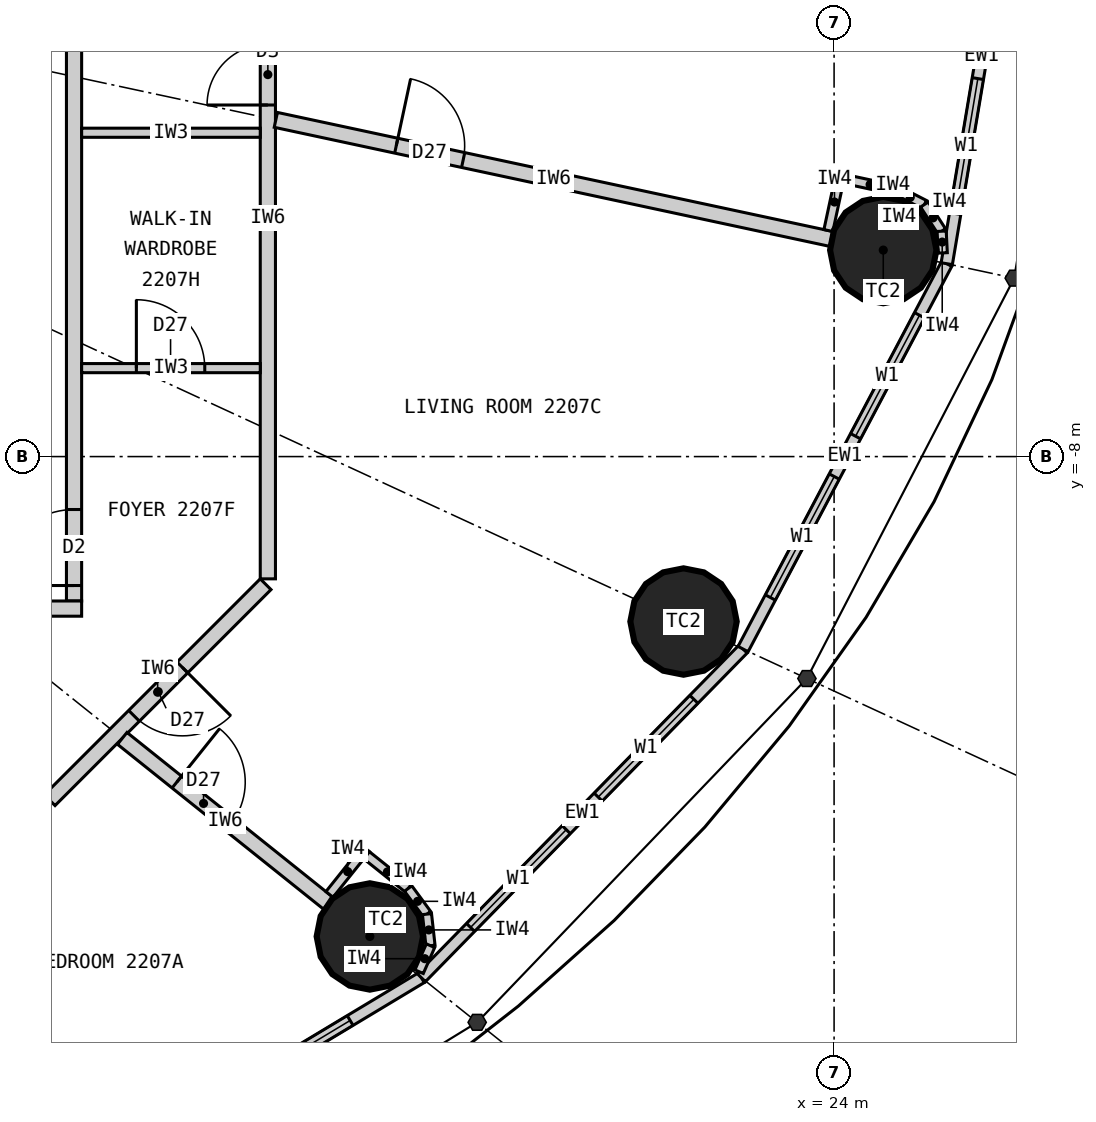
"""IFC4 building model, lengths in metres.
Left out: names, types, materials, properties, quantities, classifications, styles, units other than length and angle.
Written with IfcOpenShell. Run it as: python <this file> out.ifc"""

import sys

from ifc_helpers import new_model, si_unit, direction, frame, frame_2d, origin, origin_2d, place, context, subcontext, project, spatial, rectangle, circle, extrude, element, fill, save


model = new_model("IFC4")
c1 = context("Model", 3, precision=1e-05, world=origin(), true_north=direction((0.0, 1.0)))
c2 = subcontext(c1, "Body", "Model", "MODEL_VIEW")
j1 = project(units=[si_unit("LENGTHUNIT", "METRE"), si_unit("PLANEANGLEUNIT", "RADIAN")], contexts=[c1])
p1 = place(None, origin())
s1 = spatial("IfcSite", under=j1, at=p1, CompositionType="ELEMENT")
p2 = place(p1, origin())
s2 = spatial("IfcBuilding", under=s1, at=p2, CompositionType="ELEMENT")
p3 = place(p2, frame((0.0, 0.0, 87.0)))
s3 = spatial("IfcBuildingStorey", under=s2, at=p3, CompositionType="ELEMENT", Elevation=87.0)
for number, where, z_axis, x_axis in (
    (1, (17.892, -14.313, 0.0), (0.0, 0.0, 1.0), (1.0, 0.0, 0.0)),
    (2, (22.019, -10.17, 0.0), (0.0, 0.0, 1.0), (1.0, 0.0, 0.0)),
    (3, (24.647, -5.283, 0.0), (0.0, 0.0, 1.0), (1.0, 0.0, 0.0)),
):
    element("IfcColumn", number, at=place(p3, frame(where, z_axis=z_axis, x_axis=x_axis)), inside=s3, PredefinedType="COLUMN", context=c2, shape_type="SweptSolid", body=[
        extrude(circle(Radius=0.7, at=origin_2d()), origin(), (0.0, 0.0, 1.0), 3.3),
    ])
p4 = place(p3, frame((13.096, -18.147, 0.0), z_axis=(0.0, 0.0, 1.0), x_axis=(0.856983180864, 0.515344377787, 0.0)))
e4 = element("IfcWall", 4, at=p4, inside=s3, PredefinedType="ELEMENTEDWALL", context=c2, shape_type="SweptSolid", body=[
    extrude(rectangle(XDim=6.386, YDim=0.15, at=frame_2d((3.193, 0.0))), origin(), (0.0, 0.0, 1.0), 3.12),
])
p5 = place(p4, frame((1.093, 0.0, 0.9)))
e5 = element("IfcOpeningElement", 5, at=p5, cuts=e4, PredefinedType="OPENING", context=c2, shape_type="SweptSolid", body=[
    extrude(rectangle(XDim=1.8, YDim=1.9, at=frame_2d((0.9, 0.95))), frame((0.0, 0.085, 0.0), z_axis=(0.0, -1.0, 0.0), x_axis=(1.0, 0.0, 0.0)), (0.0, 0.0, 1.0), 0.17),
])
p6 = place(p4, frame((3.493, 0.0, 0.9)))
e6 = element("IfcOpeningElement", 6, at=p6, cuts=e4, PredefinedType="OPENING", context=c2, shape_type="SweptSolid", body=[
    extrude(rectangle(XDim=1.8, YDim=1.9, at=frame_2d((0.9, 0.95))), frame((0.0, 0.085, 0.0), z_axis=(0.0, -1.0, 0.0), x_axis=(1.0, 0.0, 0.0)), (0.0, 0.0, 1.0), 0.17),
])
p7 = place(p3, frame((18.57, -14.856, 0.0), z_axis=(0.0, 0.0, 1.0), x_axis=(0.699602905915, 0.714531856557, 0.0)))
e7 = element("IfcWall", 7, at=p7, inside=s3, PredefinedType="ELEMENTEDWALL", context=c2, shape_type="SweptSolid", body=[
    extrude(rectangle(XDim=6.051, YDim=0.15, at=frame_2d((3.025, 0.0))), origin(), (0.0, 0.0, 1.0), 3.12),
])
p8 = place(p7, frame((0.926, 0.0, 0.9)))
e8 = element("IfcOpeningElement", 8, at=p8, cuts=e7, PredefinedType="OPENING", context=c2, shape_type="SweptSolid", body=[
    extrude(rectangle(XDim=1.8, YDim=1.9, at=frame_2d((0.9, 0.95))), frame((0.0, 0.085, 0.0), z_axis=(0.0, -1.0, 0.0), x_axis=(1.0, 0.0, 0.0)), (0.0, 0.0, 1.0), 0.17),
])
p9 = place(p7, frame((3.325, 0.0, 0.9)))
e9 = element("IfcOpeningElement", 9, at=p9, cuts=e7, PredefinedType="OPENING", context=c2, shape_type="SweptSolid", body=[
    extrude(rectangle(XDim=1.8, YDim=1.9, at=frame_2d((0.9, 0.95))), frame((0.0, 0.085, 0.0), z_axis=(0.0, -1.0, 0.0), x_axis=(1.0, 0.0, 0.0)), (0.0, 0.0, 1.0), 0.17),
])
p10 = place(p3, frame((22.803, -10.532, 0.0), z_axis=(0.0, 0.0, 1.0), x_axis=(0.467296867008, 0.884100468321, 0.0)))
e10 = element("IfcWall", 10, at=p10, inside=s3, PredefinedType="ELEMENTEDWALL", context=c2, shape_type="SweptSolid", body=[
    extrude(rectangle(XDim=5.734, YDim=0.15, at=frame_2d((2.867, 0.0))), origin(), (0.0, 0.0, 1.0), 3.12),
])
p11 = place(p10, frame((0.767, 0.0, 0.9)))
e11 = element("IfcOpeningElement", 11, at=p11, cuts=e10, PredefinedType="OPENING", context=c2, shape_type="SweptSolid", body=[
    extrude(rectangle(XDim=1.8, YDim=1.9, at=frame_2d((0.9, 0.95))), frame((0.0, 0.085, 0.0), z_axis=(0.0, -1.0, 0.0), x_axis=(1.0, 0.0, 0.0)), (0.0, 0.0, 1.0), 0.17),
])
p12 = place(p10, frame((3.167, 0.0, 0.9)))
e12 = element("IfcOpeningElement", 12, at=p12, cuts=e10, PredefinedType="OPENING", context=c2, shape_type="SweptSolid", body=[
    extrude(rectangle(XDim=1.8, YDim=1.9, at=frame_2d((0.9, 0.95))), frame((0.0, 0.085, 0.0), z_axis=(0.0, -1.0, 0.0), x_axis=(1.0, 0.0, 0.0)), (0.0, 0.0, 1.0), 0.17),
])
p13 = place(p3, frame((25.482, -5.462, 0.0), z_axis=(0.0, 0.0, 1.0), x_axis=(0.165642551694, 0.986185857264, 0.0)))
e13 = element("IfcWall", 13, at=p13, inside=s3, PredefinedType="ELEMENTEDWALL", context=c2, shape_type="SweptSolid", body=[
    extrude(rectangle(XDim=5.539, YDim=0.15, at=frame_2d((2.77, 0.0))), origin(), (0.0, 0.0, 1.0), 3.12),
])
p14 = place(p13, frame((0.669, 0.0, 0.9)))
e14 = element("IfcOpeningElement", 14, at=p14, cuts=e13, PredefinedType="OPENING", context=c2, shape_type="SweptSolid", body=[
    extrude(rectangle(XDim=1.8, YDim=1.9, at=frame_2d((0.9, 0.95))), frame((0.0, 0.085, 0.0), z_axis=(0.0, -1.0, 0.0), x_axis=(1.0, 0.0, 0.0)), (0.0, 0.0, 1.0), 0.17),
])
p15 = place(p13, frame((3.07, 0.0, 0.9)))
e15 = element("IfcOpeningElement", 15, at=p15, cuts=e13, PredefinedType="OPENING", context=c2, shape_type="SweptSolid", body=[
    extrude(rectangle(XDim=1.8, YDim=1.9, at=frame_2d((0.9, 0.95))), frame((0.0, 0.085, 0.0), z_axis=(0.0, -1.0, 0.0), x_axis=(1.0, 0.0, 0.0)), (0.0, 0.0, 1.0), 0.17),
])
p16 = place(p3, frame((14.0, -9.9, 0.0), z_axis=(0.0, 0.0, 1.0), x_axis=(0.0, 1.0, 0.0)))
e16 = element("IfcWall", 16, at=p16, inside=s3, PredefinedType="PARTITIONING", context=c2, shape_type="SweptSolid", body=[
    extrude(rectangle(XDim=19.8, YDim=0.2, at=frame_2d((9.9, 0.0))), origin(), (0.0, 0.0, 1.0), 3.12),
])
p17 = place(p16, frame((0.204, 0.0, 0.0)))
e17 = element("IfcOpeningElement", 17, at=p17, cuts=e16, PredefinedType="OPENING", context=c2, shape_type="SweptSolid", body=[
    extrude(rectangle(XDim=1.0, YDim=2.2, at=frame_2d((0.5, 1.1))), frame((0.0, 0.11, 0.0), z_axis=(0.0, -1.0, 0.0), x_axis=(1.0, 0.0, 0.0)), (0.0, 0.0, 1.0), 0.22),
])
p18 = place(p16, frame((13.715, 0.0, 0.0)))
e18 = element("IfcOpeningElement", 18, at=p18, cuts=e16, PredefinedType="OPENING", context=c2, shape_type="SweptSolid", body=[
    extrude(rectangle(XDim=1.0, YDim=2.2, at=frame_2d((0.5, 1.1))), frame((0.0, 0.11, 0.0), z_axis=(0.0, -1.0, 0.0), x_axis=(1.0, 0.0, 0.0)), (0.0, 0.0, 1.0), 0.22),
])
p19 = place(p16, frame((18.698, 0.0, 0.0)))
e19 = element("IfcOpeningElement", 19, at=p19, cuts=e16, PredefinedType="OPENING", context=c2, shape_type="SweptSolid", body=[
    extrude(rectangle(XDim=1.0, YDim=2.2, at=frame_2d((0.5, 1.1))), frame((0.0, 0.11, 0.0), z_axis=(0.0, -1.0, 0.0), x_axis=(1.0, 0.0, 0.0)), (0.0, 0.0, 1.0), 0.22),
])
p20 = place(p3, frame((13.679, -12.521, 0.0), z_axis=(0.0, 0.0, 1.0), x_axis=(0.707106781187, 0.707106781187, 0.0)))
e20 = element("IfcWall", 20, at=p20, inside=s3, PredefinedType="PARTITIONING", context=c2, shape_type="SweptSolid", body=[
    extrude(rectangle(XDim=4.019, YDim=0.2, at=frame_2d((2.009, 0.0))), origin(), (0.0, 0.0, 1.0), 3.12),
])
p21 = place(p20, frame((1.57, 0.0, 0.0)))
e21 = element("IfcOpeningElement", 21, at=p21, cuts=e20, PredefinedType="OPENING", context=c2, shape_type="SweptSolid", body=[
    extrude(rectangle(XDim=0.9, YDim=2.1, at=frame_2d((0.45, 1.05))), frame((0.0, 0.11, 0.0), z_axis=(0.0, -1.0, 0.0), x_axis=(1.0, 0.0, 0.0)), (0.0, 0.0, 1.0), 0.22),
])
p22 = place(p3, frame((16.55, -9.609, 0.0), z_axis=(0.0, 0.0, 1.0), x_axis=(0.0, 1.0, 0.0)))
e22 = element("IfcWall", 22, at=p22, inside=s3, PredefinedType="PARTITIONING", context=c2, shape_type="SweptSolid", body=[
    extrude(rectangle(XDim=9.508, YDim=0.2, at=frame_2d((4.754, 0.0))), origin(), (0.0, 0.0, 1.0), 3.12),
])
p23 = place(p22, frame((6.234, 0.0, 0.0)))
e23 = element("IfcOpeningElement", 23, at=p23, cuts=e22, PredefinedType="OPENING", context=c2, shape_type="SweptSolid", body=[
    extrude(rectangle(XDim=0.8, YDim=2.1, at=frame_2d((0.4, 1.05))), frame((0.0, 0.11, 0.0), z_axis=(0.0, -1.0, 0.0), x_axis=(1.0, 0.0, 0.0)), (0.0, 0.0, 1.0), 0.22),
])
p24 = place(p3, frame((14.634, -11.707, 0.0), z_axis=(0.0, 0.0, 1.0), x_axis=(0.780903110683, -0.624652168591, 0.0)))
e24 = element("IfcWall", 24, at=p24, inside=s3, PredefinedType="PARTITIONING", context=c2, shape_type="SweptSolid", body=[
    extrude(rectangle(XDim=3.472, YDim=0.2, at=frame_2d((1.736, 0.0))), origin(), (0.0, 0.0, 1.0), 2.27),
])
p25 = place(p24, frame((0.92, 0.0, 0.0)))
e25 = element("IfcOpeningElement", 25, at=p25, cuts=e24, PredefinedType="OPENING", context=c2, shape_type="SweptSolid", body=[
    extrude(rectangle(XDim=0.9, YDim=2.1, at=frame_2d((0.45, 1.05))), frame((0.0, 0.11, 0.0), z_axis=(0.0, -1.0, 0.0), x_axis=(1.0, 0.0, 0.0)), (0.0, 0.0, 1.0), 0.22),
])
p26 = place(p3, frame((16.655, -3.57, 0.0), z_axis=(0.0, 0.0, 1.0), x_axis=(0.977790461522, -0.209584859557, 0.0)))
e26 = element("IfcWall", 26, at=p26, inside=s3, PredefinedType="PARTITIONING", context=c2, shape_type="SweptSolid", body=[
    extrude(rectangle(XDim=7.474, YDim=0.2, at=frame_2d((3.737, 0.0))), origin(), (0.0, 0.0, 1.0), 2.27),
])
p27 = place(p26, frame((1.621, 0.0, 0.0)))
e27 = element("IfcOpeningElement", 27, at=p27, cuts=e26, PredefinedType="OPENING", context=c2, shape_type="SweptSolid", body=[
    extrude(rectangle(XDim=0.9, YDim=2.1, at=frame_2d((0.45, 1.05))), frame((0.0, 0.11, 0.0), z_axis=(0.0, -1.0, 0.0), x_axis=(1.0, 0.0, 0.0)), (0.0, 0.0, 1.0), 0.22),
])
p28 = place(p3, frame((14.1, -6.836, 0.0), z_axis=(0.0, 0.0, 1.0), x_axis=(1.0, 0.0, 0.0)))
e28 = element("IfcWall", 28, at=p28, inside=s3, PredefinedType="PARTITIONING", context=c2, shape_type="SweptSolid", body=[
    extrude(rectangle(XDim=2.35, YDim=0.12, at=frame_2d((1.175, 0.0))), origin(), (0.0, 0.0, 1.0), 3.12),
])
p29 = place(p28, frame((0.72, 0.0, 0.0)))
e29 = element("IfcOpeningElement", 29, at=p29, cuts=e28, PredefinedType="OPENING", context=c2, shape_type="SweptSolid", body=[
    extrude(rectangle(XDim=0.9, YDim=2.1, at=frame_2d((0.45, 1.05))), frame((0.0, 0.07, 0.0), z_axis=(0.0, -1.0, 0.0), x_axis=(1.0, 0.0, 0.0)), (0.0, 0.0, 1.0), 0.14),
])
p30 = place(p3, frame((14.1, -3.74, 0.0), z_axis=(0.0, 0.0, 1.0), x_axis=(1.0, 0.0, 0.0)))
e30 = element("IfcWall", 30, at=p30, inside=s3, PredefinedType="PARTITIONING", context=c2, shape_type="SweptSolid", body=[
    extrude(rectangle(XDim=2.35, YDim=0.12, at=frame_2d((1.175, 0.0))), origin(), (0.0, 0.0, 1.0), 2.27),
])
p31 = place(p3, frame((14.1, -10.0, 0.0), z_axis=(0.0, 0.0, 1.0), x_axis=(-1.0, 0.0, 0.0)))
e31 = element("IfcWall", 31, at=p31, inside=s3, PredefinedType="PARTITIONING", context=c2, shape_type="SweptSolid", body=[
    extrude(rectangle(XDim=24.429, YDim=0.2, at=frame_2d((12.215, 0.0))), origin(), (0.0, 0.0, 1.0), 3.12),
])
p32 = place(p31, frame((13.597, 0.0, 0.0)))
e32 = element("IfcOpeningElement", 32, at=p32, cuts=e31, PredefinedType="OPENING", context=c2, shape_type="SweptSolid", body=[
    extrude(rectangle(XDim=1.0, YDim=2.2, at=frame_2d((0.5, 1.1))), frame((0.0, 0.11, 0.0), z_axis=(0.0, -1.0, 0.0), x_axis=(1.0, 0.0, 0.0)), (0.0, 0.0, 1.0), 0.22),
])
p33 = place(p3, frame((17.361, -13.76, 0.0), z_axis=(0.0, 0.0, 1.0), x_axis=(0.624501042889, 0.781023973659, 0.0)))
e33 = element("IfcWall", 33, at=p33, inside=s3, PredefinedType="PARTITIONING", context=c2, shape_type="SweptSolid", body=[
    extrude(rectangle(XDim=0.767, YDim=0.12, at=frame_2d((0.384, 0.0))), origin(), (0.0, 0.0, 1.0), 3.12),
])
p34 = place(p3, frame((17.85, -13.246, 0.0), z_axis=(0.0, 0.0, 1.0), x_axis=(0.780902834923, -0.62465251333, 0.0)))
e34 = element("IfcWall", 34, at=p34, inside=s3, PredefinedType="PARTITIONING", context=c2, shape_type="SweptSolid", body=[
    extrude(rectangle(XDim=0.7, YDim=0.12, at=frame_2d((0.35, 0.0))), origin(), (0.0, 0.0, 1.0), 3.12),
])
for number, where, z_axis, x_axis in (
    (35, (18.396, -13.683, 0.0), (0.0, 0.0, 1.0), (0.592, -0.806, 0.0)),
    (36, (18.644, -14.02, 0.0), (0.0, 0.0, 1.0), (0.11, -0.994, 0.0)),
):
    element("IfcWall", number, at=place(p3, frame(where, z_axis=z_axis, x_axis=x_axis)), inside=s3, PredefinedType="PARTITIONING", context=c2, shape_type="SweptSolid", body=[
        extrude(rectangle(XDim=0.418, YDim=0.12, at=frame_2d((0.209, 0.0))), origin(), (0.0, 0.0, 1.0), 3.12),
    ])
p35 = place(p3, frame((18.69, -14.435, 0.0), z_axis=(0.0, 0.0, 1.0), x_axis=(-0.401093412634, -0.91603715773, 0.0)))
e37 = element("IfcWall", 37, at=p35, inside=s3, PredefinedType="PARTITIONING", context=c2, shape_type="SweptSolid", body=[
    extrude(rectangle(XDim=0.373, YDim=0.12, at=frame_2d((0.187, 0.0))), origin(), (0.0, 0.0, 1.0), 3.12),
])
p36 = place(p3, frame((23.925, -5.026, 0.0), z_axis=(0.0, 0.0, 1.0), x_axis=(0.209681192172, 0.977769808109, 0.0)))
e38 = element("IfcWall", 38, at=p36, inside=s3, PredefinedType="PARTITIONING", context=c2, shape_type="SweptSolid", body=[
    extrude(rectangle(XDim=0.767, YDim=0.12, at=frame_2d((0.384, 0.0))), origin(), (0.0, 0.0, 1.0), 3.12),
])
p37 = place(p3, frame((24.132, -4.347, 0.0), z_axis=(0.0, 0.0, 1.0), x_axis=(0.977776882509, -0.209648200638, 0.0)))
e39 = element("IfcWall", 39, at=p37, inside=s3, PredefinedType="PARTITIONING", context=c2, shape_type="SweptSolid", body=[
    extrude(rectangle(XDim=0.7, YDim=0.12, at=frame_2d((0.35, 0.0))), origin(), (0.0, 0.0, 1.0), 3.12),
])
for number, where, z_axis, x_axis in (
    (40, (24.816, -4.494, 0.0), (0.0, 0.0, 1.0), (0.89, -0.455, 0.0)),
    (41, (25.188, -4.684, 0.0), (0.0, 0.0, 1.0), (0.543, -0.84, 0.0)),
):
    element("IfcWall", number, at=place(p3, frame(where, z_axis=z_axis, x_axis=x_axis)), inside=s3, PredefinedType="PARTITIONING", context=c2, shape_type="SweptSolid", body=[
        extrude(rectangle(XDim=0.418, YDim=0.12, at=frame_2d((0.209, 0.0))), origin(), (0.0, 0.0, 1.0), 3.12),
    ])
p38 = place(p3, frame((25.416, -5.035, 0.0), z_axis=(0.0, 0.0, 1.0), x_axis=(0.050406329159, -0.998728793007, 0.0)))
e42 = element("IfcWall", 42, at=p38, inside=s3, PredefinedType="PARTITIONING", context=c2, shape_type="SweptSolid", body=[
    extrude(rectangle(XDim=0.286, YDim=0.12, at=frame_2d((0.143, 0.0))), origin(), (0.0, 0.0, 1.0), 3.12),
])
p39 = place(p6, origin())
e43 = element("IfcWindow", 43, at=p39, inside=s3, PartitioningType="SINGLE_PANEL", PredefinedType="WINDOW", context=c2, shape_type="SweptSolid", body=[
    extrude(rectangle(XDim=1.8, YDim=1.9, at=frame_2d((0.9, 0.95))), frame((0.0, 0.03, 0.0), z_axis=(0.0, -1.0, 0.0), x_axis=(1.0, 0.0, 0.0)), (0.0, 0.0, 1.0), 0.06),
])
fill(e6, e43)
p40 = place(p8, origin())
e44 = element("IfcWindow", 44, at=p40, inside=s3, PartitioningType="SINGLE_PANEL", PredefinedType="WINDOW", context=c2, shape_type="SweptSolid", body=[
    extrude(rectangle(XDim=1.8, YDim=1.9, at=frame_2d((0.9, 0.95))), frame((0.0, 0.03, 0.0), z_axis=(0.0, -1.0, 0.0), x_axis=(1.0, 0.0, 0.0)), (0.0, 0.0, 1.0), 0.06),
])
fill(e8, e44)
p41 = place(p9, origin())
e45 = element("IfcWindow", 45, at=p41, inside=s3, PartitioningType="SINGLE_PANEL", PredefinedType="WINDOW", context=c2, shape_type="SweptSolid", body=[
    extrude(rectangle(XDim=1.8, YDim=1.9, at=frame_2d((0.9, 0.95))), frame((0.0, 0.03, 0.0), z_axis=(0.0, -1.0, 0.0), x_axis=(1.0, 0.0, 0.0)), (0.0, 0.0, 1.0), 0.06),
])
fill(e9, e45)
p42 = place(p11, origin())
e46 = element("IfcWindow", 46, at=p42, inside=s3, PartitioningType="SINGLE_PANEL", PredefinedType="WINDOW", context=c2, shape_type="SweptSolid", body=[
    extrude(rectangle(XDim=1.8, YDim=1.9, at=frame_2d((0.9, 0.95))), frame((0.0, 0.03, 0.0), z_axis=(0.0, -1.0, 0.0), x_axis=(1.0, 0.0, 0.0)), (0.0, 0.0, 1.0), 0.06),
])
fill(e11, e46)
p43 = place(p12, origin())
e47 = element("IfcWindow", 47, at=p43, inside=s3, PartitioningType="SINGLE_PANEL", PredefinedType="WINDOW", context=c2, shape_type="SweptSolid", body=[
    extrude(rectangle(XDim=1.8, YDim=1.9, at=frame_2d((0.9, 0.95))), frame((0.0, 0.03, 0.0), z_axis=(0.0, -1.0, 0.0), x_axis=(1.0, 0.0, 0.0)), (0.0, 0.0, 1.0), 0.06),
])
fill(e12, e47)
p44 = place(p14, origin())
e48 = element("IfcWindow", 48, at=p44, inside=s3, PartitioningType="SINGLE_PANEL", PredefinedType="WINDOW", context=c2, shape_type="SweptSolid", body=[
    extrude(rectangle(XDim=1.8, YDim=1.9, at=frame_2d((0.9, 0.95))), frame((0.0, 0.03, 0.0), z_axis=(0.0, -1.0, 0.0), x_axis=(1.0, 0.0, 0.0)), (0.0, 0.0, 1.0), 0.06),
])
fill(e14, e48)
p45 = place(p17, origin())
e49 = element("IfcDoor", 49, at=p45, inside=s3, OperationType="SINGLE_SWING_LEFT", PredefinedType="DOOR", context=c2, shape_type="SweptSolid", body=[
    extrude(rectangle(XDim=1.0, YDim=2.2, at=frame_2d((0.5, 1.1))), frame((0.0, 0.025, 0.0), z_axis=(0.0, -1.0, 0.0), x_axis=(1.0, 0.0, 0.0)), (0.0, 0.0, 1.0), 0.05),
])
fill(e17, e49)
p46 = place(p29, origin())
e50 = element("IfcDoor", 50, at=p46, inside=s3, OperationType="SINGLE_SWING_LEFT", PredefinedType="DOOR", context=c2, shape_type="SweptSolid", body=[
    extrude(rectangle(XDim=0.9, YDim=2.1, at=frame_2d((0.45, 1.05))), frame((0.0, 0.025, 0.0), z_axis=(0.0, -1.0, 0.0), x_axis=(1.0, 0.0, 0.0)), (0.0, 0.0, 1.0), 0.05),
])
fill(e29, e50)
p47 = place(p23, origin())
e51 = element("IfcDoor", 51, at=p47, inside=s3, OperationType="SINGLE_SWING_LEFT", PredefinedType="DOOR", context=c2, shape_type="SweptSolid", body=[
    extrude(rectangle(XDim=0.8, YDim=2.1, at=frame_2d((0.4, 1.05))), frame((0.0, 0.025, 0.0), z_axis=(0.0, -1.0, 0.0), x_axis=(1.0, 0.0, 0.0)), (0.0, 0.0, 1.0), 0.05),
])
fill(e23, e51)
p48 = place(p21, origin())
e52 = element("IfcDoor", 52, at=p48, inside=s3, OperationType="SINGLE_SWING_RIGHT", PredefinedType="DOOR", context=c2, shape_type="SweptSolid", body=[
    extrude(rectangle(XDim=0.9, YDim=2.1, at=frame_2d((0.45, 1.05))), frame((0.0, 0.025, 0.0), z_axis=(0.0, -1.0, 0.0), x_axis=(1.0, 0.0, 0.0)), (0.0, 0.0, 1.0), 0.05),
])
fill(e21, e52)
p49 = place(p25, origin())
e53 = element("IfcDoor", 53, at=p49, inside=s3, OperationType="SINGLE_SWING_LEFT", PredefinedType="DOOR", context=c2, shape_type="SweptSolid", body=[
    extrude(rectangle(XDim=0.9, YDim=2.1, at=frame_2d((0.45, 1.05))), frame((0.0, 0.025, 0.0), z_axis=(0.0, -1.0, 0.0), x_axis=(1.0, 0.0, 0.0)), (0.0, 0.0, 1.0), 0.05),
])
fill(e25, e53)
p50 = place(p27, origin())
e54 = element("IfcDoor", 54, at=p50, inside=s3, OperationType="SINGLE_SWING_LEFT", PredefinedType="DOOR", context=c2, shape_type="SweptSolid", body=[
    extrude(rectangle(XDim=0.9, YDim=2.1, at=frame_2d((0.45, 1.05))), frame((0.0, 0.025, 0.0), z_axis=(0.0, -1.0, 0.0), x_axis=(1.0, 0.0, 0.0)), (0.0, 0.0, 1.0), 0.05),
])
fill(e27, e54)
save(model, sys.argv[1])
